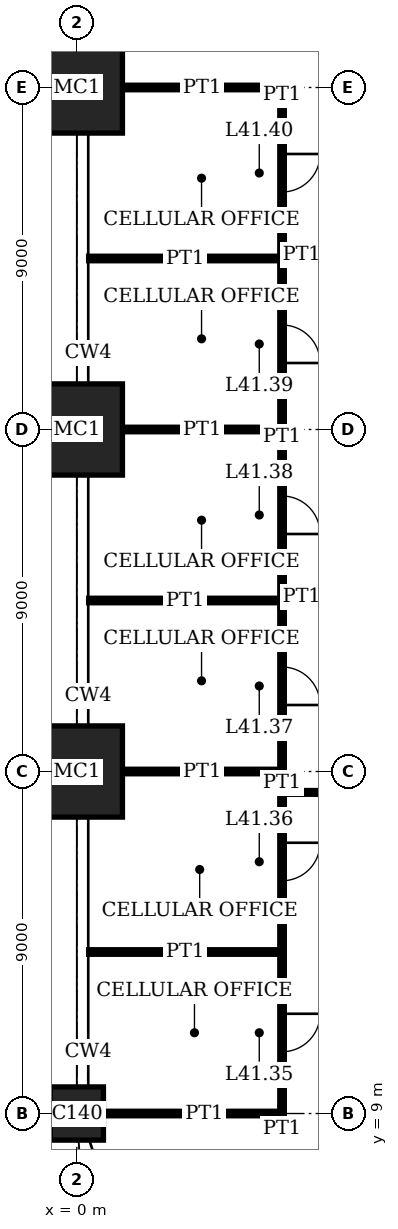
"""IFC4 building model, lengths in metres.
Left out: names, types, materials, properties, quantities, classifications, styles, units other than length and angle.
Written with IfcOpenShell. Run it as: python <this file> out.ifc"""

import sys

from ifc_helpers import new_model, si_unit, direction, frame, frame_2d, origin, origin_2d, place, context, subcontext, project, spatial, rectangle, extrude, element, fill, save


model = new_model("IFC4")
c1 = context("Model", 3, precision=1e-05, world=origin(), true_north=direction((0.0, 1.0)))
c2 = subcontext(c1, "Body", "Model", "MODEL_VIEW")
j1 = project(units=[si_unit("LENGTHUNIT", "METRE"), si_unit("PLANEANGLEUNIT", "RADIAN")], contexts=[c1])
p1 = place(None, origin())
s1 = spatial("IfcSite", under=j1, at=p1, CompositionType="ELEMENT")
p2 = place(p1, origin())
s2 = spatial("IfcBuilding", under=s1, at=p2, CompositionType="ELEMENT")
p3 = place(p2, frame((0.0, 0.0, 170.2)))
s3 = spatial("IfcBuildingStorey", under=s2, at=p3, CompositionType="ELEMENT", Elevation=170.2)
p4 = place(p3, frame((0.0, 9.0, 0.0), z_axis=(0.0, 0.0, 1.0), x_axis=(1.0, 0.0, 0.0)))
e1 = element("IfcColumn", 1, at=p4, inside=s3, PredefinedType="COLUMN", context=c2, shape_type="SweptSolid", body=[
    extrude(rectangle(XDim=1.4, YDim=1.4, at=origin_2d()), origin(), (0.0, 0.0, 1.0), 4.0),
])
for number, where, z_axis, x_axis in (
    (2, (0.0, 18.0, 0.0), (0.0, 0.0, 1.0), (1.0, 0.0, 0.0)),
    (3, (0.0, 27.0, 0.0), (0.0, 0.0, 1.0), (1.0, 0.0, 0.0)),
    (4, (0.0, 36.0, 0.0), (0.0, 0.0, 1.0), (1.0, 0.0, 0.0)),
):
    element("IfcColumn", number, at=place(p3, frame(where, z_axis=z_axis, x_axis=x_axis)), inside=s3, PredefinedType="COLUMN", context=c2, shape_type="SweptSolid", body=[
        extrude(rectangle(XDim=2.4, YDim=2.4, at=origin_2d()), origin(), (0.0, 0.0, 1.0), 4.0),
    ])
p5 = place(p3, frame((0.7, 9.0, 0.0), z_axis=(0.0, 0.0, 1.0), x_axis=(1.0, 0.0, 0.0)))
e5 = element("IfcWall", 5, at=p5, inside=s3, PredefinedType="PARTITIONING", context=c2, shape_type="SweptSolid", body=[
    extrude(rectangle(XDim=4.7, YDim=0.12, at=frame_2d((2.35, 0.0))), origin(), (0.0, 0.0, 1.0), 3.05),
])
p6 = place(p3, frame((0.31, 13.25, 0.0), z_axis=(0.0, 0.0, 1.0), x_axis=(1.0, 0.0, 0.0)))
e6 = element("IfcWall", 6, at=p6, inside=s3, PredefinedType="PARTITIONING", context=c2, shape_type="SweptSolid", body=[
    extrude(rectangle(XDim=5.09, YDim=0.12, at=frame_2d((2.545, 0.0))), origin(), (0.0, 0.0, 1.0), 3.1),
])
p7 = place(p3, frame((5.39, 17.45, 0.0), z_axis=(0.0, 0.0, 1.0), x_axis=(1.0, 0.0, 0.0)))
e7 = element("IfcWall", 7, at=p7, inside=s3, PredefinedType="PARTITIONING", context=c2, shape_type="SweptSolid", body=[
    extrude(rectangle(XDim=2.81, YDim=0.1, at=frame_2d((1.405, 0.0))), origin(), (0.0, 0.0, 1.0), 3.75),
])
p8 = place(p3, frame((1.2, 18.0, 0.0), z_axis=(0.0, 0.0, 1.0), x_axis=(1.0, 0.0, 0.0)))
e8 = element("IfcWall", 8, at=p8, inside=s3, PredefinedType="PARTITIONING", context=c2, shape_type="SweptSolid", body=[
    extrude(rectangle(XDim=4.2, YDim=0.12, at=frame_2d((2.1, 0.0))), origin(), (0.0, 0.0, 1.0), 3.05),
])
p9 = place(p3, frame((0.31, 22.5, 0.0), z_axis=(0.0, 0.0, 1.0), x_axis=(1.0, 0.0, 0.0)))
e9 = element("IfcWall", 9, at=p9, inside=s3, PredefinedType="PARTITIONING", context=c2, shape_type="SweptSolid", body=[
    extrude(rectangle(XDim=5.09, YDim=0.12, at=frame_2d((2.545, 0.0))), origin(), (0.0, 0.0, 1.0), 3.1),
])
p10 = place(p3, frame((1.2, 27.0, 0.0), z_axis=(0.0, 0.0, 1.0), x_axis=(1.0, 0.0, 0.0)))
e10 = element("IfcWall", 10, at=p10, inside=s3, PredefinedType="PARTITIONING", context=c2, shape_type="SweptSolid", body=[
    extrude(rectangle(XDim=4.2, YDim=0.12, at=frame_2d((2.1, 0.0))), origin(), (0.0, 0.0, 1.0), 3.05),
])
p11 = place(p3, frame((0.31, 31.5, 0.0), z_axis=(0.0, 0.0, 1.0), x_axis=(1.0, 0.0, 0.0)))
e11 = element("IfcWall", 11, at=p11, inside=s3, PredefinedType="PARTITIONING", context=c2, shape_type="SweptSolid", body=[
    extrude(rectangle(XDim=5.09, YDim=0.12, at=frame_2d((2.545, 0.0))), origin(), (0.0, 0.0, 1.0), 3.1),
])
p12 = place(p3, frame((1.2, 36.0, 0.0), z_axis=(0.0, 0.0, 1.0), x_axis=(1.0, 0.0, 0.0)))
e12 = element("IfcWall", 12, at=p12, inside=s3, PredefinedType="PARTITIONING", context=c2, shape_type="SweptSolid", body=[
    extrude(rectangle(XDim=4.2, YDim=0.12, at=frame_2d((2.1, 0.0))), origin(), (0.0, 0.0, 1.0), 3.05),
])
p13 = place(p3, frame((5.4, 9.0, 0.0), z_axis=(0.0, 0.0, 1.0), x_axis=(0.0, 1.0, 0.0)))
e13 = element("IfcWall", 13, at=p13, inside=s3, PredefinedType="PARTITIONING", context=c2, shape_type="SweptSolid", body=[
    extrude(rectangle(XDim=4.25, YDim=0.12, at=frame_2d((2.125, 0.0))), origin(), (0.0, 0.0, 1.0), 3.75),
])
p14 = place(p13, frame((1.625, 0.0, 0.0)))
e14 = element("IfcOpeningElement", 14, at=p14, cuts=e13, PredefinedType="OPENING", context=c2, shape_type="SweptSolid", body=[
    extrude(rectangle(XDim=1.0, YDim=2.4, at=frame_2d((0.5, 1.2))), frame((0.0, 0.07, 0.0), z_axis=(0.0, -1.0, 0.0), x_axis=(1.0, 0.0, 0.0)), (0.0, 0.0, 1.0), 0.14),
])
p15 = place(p3, frame((5.4, 13.25, 0.0), z_axis=(0.0, 0.0, 1.0), x_axis=(0.0, 1.0, 0.0)))
e15 = element("IfcWall", 15, at=p15, inside=s3, PredefinedType="PARTITIONING", context=c2, shape_type="SweptSolid", body=[
    extrude(rectangle(XDim=4.75, YDim=0.12, at=frame_2d((2.375, 0.0))), origin(), (0.0, 0.0, 1.0), 3.75),
])
p16 = place(p15, frame((1.875, 0.0, 0.0)))
e16 = element("IfcOpeningElement", 16, at=p16, cuts=e15, PredefinedType="OPENING", context=c2, shape_type="SweptSolid", body=[
    extrude(rectangle(XDim=1.0, YDim=2.4, at=frame_2d((0.5, 1.2))), frame((0.0, 0.07, 0.0), z_axis=(0.0, -1.0, 0.0), x_axis=(1.0, 0.0, 0.0)), (0.0, 0.0, 1.0), 0.14),
])
p17 = place(p3, frame((5.4, 18.0, 0.0), z_axis=(0.0, 0.0, 1.0), x_axis=(0.0, 1.0, 0.0)))
e17 = element("IfcWall", 17, at=p17, inside=s3, PredefinedType="PARTITIONING", context=c2, shape_type="SweptSolid", body=[
    extrude(rectangle(XDim=4.5, YDim=0.12, at=frame_2d((2.25, 0.0))), origin(), (0.0, 0.0, 1.0), 3.75),
])
p18 = place(p17, frame((1.75, 0.0, 0.0)))
e18 = element("IfcOpeningElement", 18, at=p18, cuts=e17, PredefinedType="OPENING", context=c2, shape_type="SweptSolid", body=[
    extrude(rectangle(XDim=1.0, YDim=2.4, at=frame_2d((0.5, 1.2))), frame((0.0, 0.07, 0.0), z_axis=(0.0, -1.0, 0.0), x_axis=(1.0, 0.0, 0.0)), (0.0, 0.0, 1.0), 0.14),
])
p19 = place(p3, frame((5.4, 22.5, 0.0), z_axis=(0.0, 0.0, 1.0), x_axis=(0.0, 1.0, 0.0)))
e19 = element("IfcWall", 19, at=p19, inside=s3, PredefinedType="PARTITIONING", context=c2, shape_type="SweptSolid", body=[
    extrude(rectangle(XDim=4.5, YDim=0.12, at=frame_2d((2.25, 0.0))), origin(), (0.0, 0.0, 1.0), 3.75),
])
p20 = place(p19, frame((1.75, 0.0, 0.0)))
e20 = element("IfcOpeningElement", 20, at=p20, cuts=e19, PredefinedType="OPENING", context=c2, shape_type="SweptSolid", body=[
    extrude(rectangle(XDim=1.0, YDim=2.4, at=frame_2d((0.5, 1.2))), frame((0.0, 0.07, 0.0), z_axis=(0.0, -1.0, 0.0), x_axis=(1.0, 0.0, 0.0)), (0.0, 0.0, 1.0), 0.14),
])
p21 = place(p3, frame((5.4, 27.0, 0.0), z_axis=(0.0, 0.0, 1.0), x_axis=(0.0, 1.0, 0.0)))
e21 = element("IfcWall", 21, at=p21, inside=s3, PredefinedType="PARTITIONING", context=c2, shape_type="SweptSolid", body=[
    extrude(rectangle(XDim=4.5, YDim=0.12, at=frame_2d((2.25, 0.0))), origin(), (0.0, 0.0, 1.0), 3.75),
])
p22 = place(p21, frame((1.75, 0.0, 0.0)))
e22 = element("IfcOpeningElement", 22, at=p22, cuts=e21, PredefinedType="OPENING", context=c2, shape_type="SweptSolid", body=[
    extrude(rectangle(XDim=1.0, YDim=2.4, at=frame_2d((0.5, 1.2))), frame((0.0, 0.07, 0.0), z_axis=(0.0, -1.0, 0.0), x_axis=(1.0, 0.0, 0.0)), (0.0, 0.0, 1.0), 0.14),
])
p23 = place(p3, frame((5.4, 31.5, 0.0), z_axis=(0.0, 0.0, 1.0), x_axis=(0.0, 1.0, 0.0)))
e23 = element("IfcWall", 23, at=p23, inside=s3, PredefinedType="PARTITIONING", context=c2, shape_type="SweptSolid", body=[
    extrude(rectangle(XDim=4.5, YDim=0.12, at=frame_2d((2.25, 0.0))), origin(), (0.0, 0.0, 1.0), 3.75),
])
p24 = place(p23, frame((1.75, 0.0, 0.0)))
e24 = element("IfcOpeningElement", 24, at=p24, cuts=e23, PredefinedType="OPENING", context=c2, shape_type="SweptSolid", body=[
    extrude(rectangle(XDim=1.0, YDim=2.4, at=frame_2d((0.5, 1.2))), frame((0.0, 0.07, 0.0), z_axis=(0.0, -1.0, 0.0), x_axis=(1.0, 0.0, 0.0)), (0.0, 0.0, 1.0), 0.14),
])
p25 = place(p14, origin())
e25 = element("IfcDoor", 25, at=p25, inside=s3, OperationType="SINGLE_SWING_RIGHT", PredefinedType="DOOR", context=c2, shape_type="SweptSolid", body=[
    extrude(rectangle(XDim=1.0, YDim=2.4, at=frame_2d((0.5, 1.2))), frame((0.0, 0.025, 0.0), z_axis=(0.0, -1.0, 0.0), x_axis=(1.0, 0.0, 0.0)), (0.0, 0.0, 1.0), 0.05),
])
fill(e14, e25)
p26 = place(p16, origin())
e26 = element("IfcDoor", 26, at=p26, inside=s3, OperationType="SINGLE_SWING_RIGHT", PredefinedType="DOOR", context=c2, shape_type="SweptSolid", body=[
    extrude(rectangle(XDim=1.0, YDim=2.4, at=frame_2d((0.5, 1.2))), frame((0.0, 0.025, 0.0), z_axis=(0.0, -1.0, 0.0), x_axis=(1.0, 0.0, 0.0)), (0.0, 0.0, 1.0), 0.05),
])
fill(e16, e26)
p27 = place(p18, origin())
e27 = element("IfcDoor", 27, at=p27, inside=s3, OperationType="SINGLE_SWING_LEFT", PredefinedType="DOOR", context=c2, shape_type="SweptSolid", body=[
    extrude(rectangle(XDim=1.0, YDim=2.4, at=frame_2d((0.5, 1.2))), frame((0.0, 0.025, 0.0), z_axis=(0.0, -1.0, 0.0), x_axis=(1.0, 0.0, 0.0)), (0.0, 0.0, 1.0), 0.05),
])
fill(e18, e27)
p28 = place(p20, origin())
e28 = element("IfcDoor", 28, at=p28, inside=s3, OperationType="SINGLE_SWING_LEFT", PredefinedType="DOOR", context=c2, shape_type="SweptSolid", body=[
    extrude(rectangle(XDim=1.0, YDim=2.4, at=frame_2d((0.5, 1.2))), frame((0.0, 0.025, 0.0), z_axis=(0.0, -1.0, 0.0), x_axis=(1.0, 0.0, 0.0)), (0.0, 0.0, 1.0), 0.05),
])
fill(e20, e28)
p29 = place(p22, origin())
e29 = element("IfcDoor", 29, at=p29, inside=s3, OperationType="SINGLE_SWING_LEFT", PredefinedType="DOOR", context=c2, shape_type="SweptSolid", body=[
    extrude(rectangle(XDim=1.0, YDim=2.4, at=frame_2d((0.5, 1.2))), frame((0.0, 0.025, 0.0), z_axis=(0.0, -1.0, 0.0), x_axis=(1.0, 0.0, 0.0)), (0.0, 0.0, 1.0), 0.05),
])
fill(e22, e29)
p30 = place(p24, origin())
e30 = element("IfcDoor", 30, at=p30, inside=s3, OperationType="SINGLE_SWING_RIGHT", PredefinedType="DOOR", context=c2, shape_type="SweptSolid", body=[
    extrude(rectangle(XDim=1.0, YDim=2.4, at=frame_2d((0.5, 1.2))), frame((0.0, 0.025, 0.0), z_axis=(0.0, -1.0, 0.0), x_axis=(1.0, 0.0, 0.0)), (0.0, 0.0, 1.0), 0.05),
])
fill(e24, e30)
save(model, sys.argv[1])
